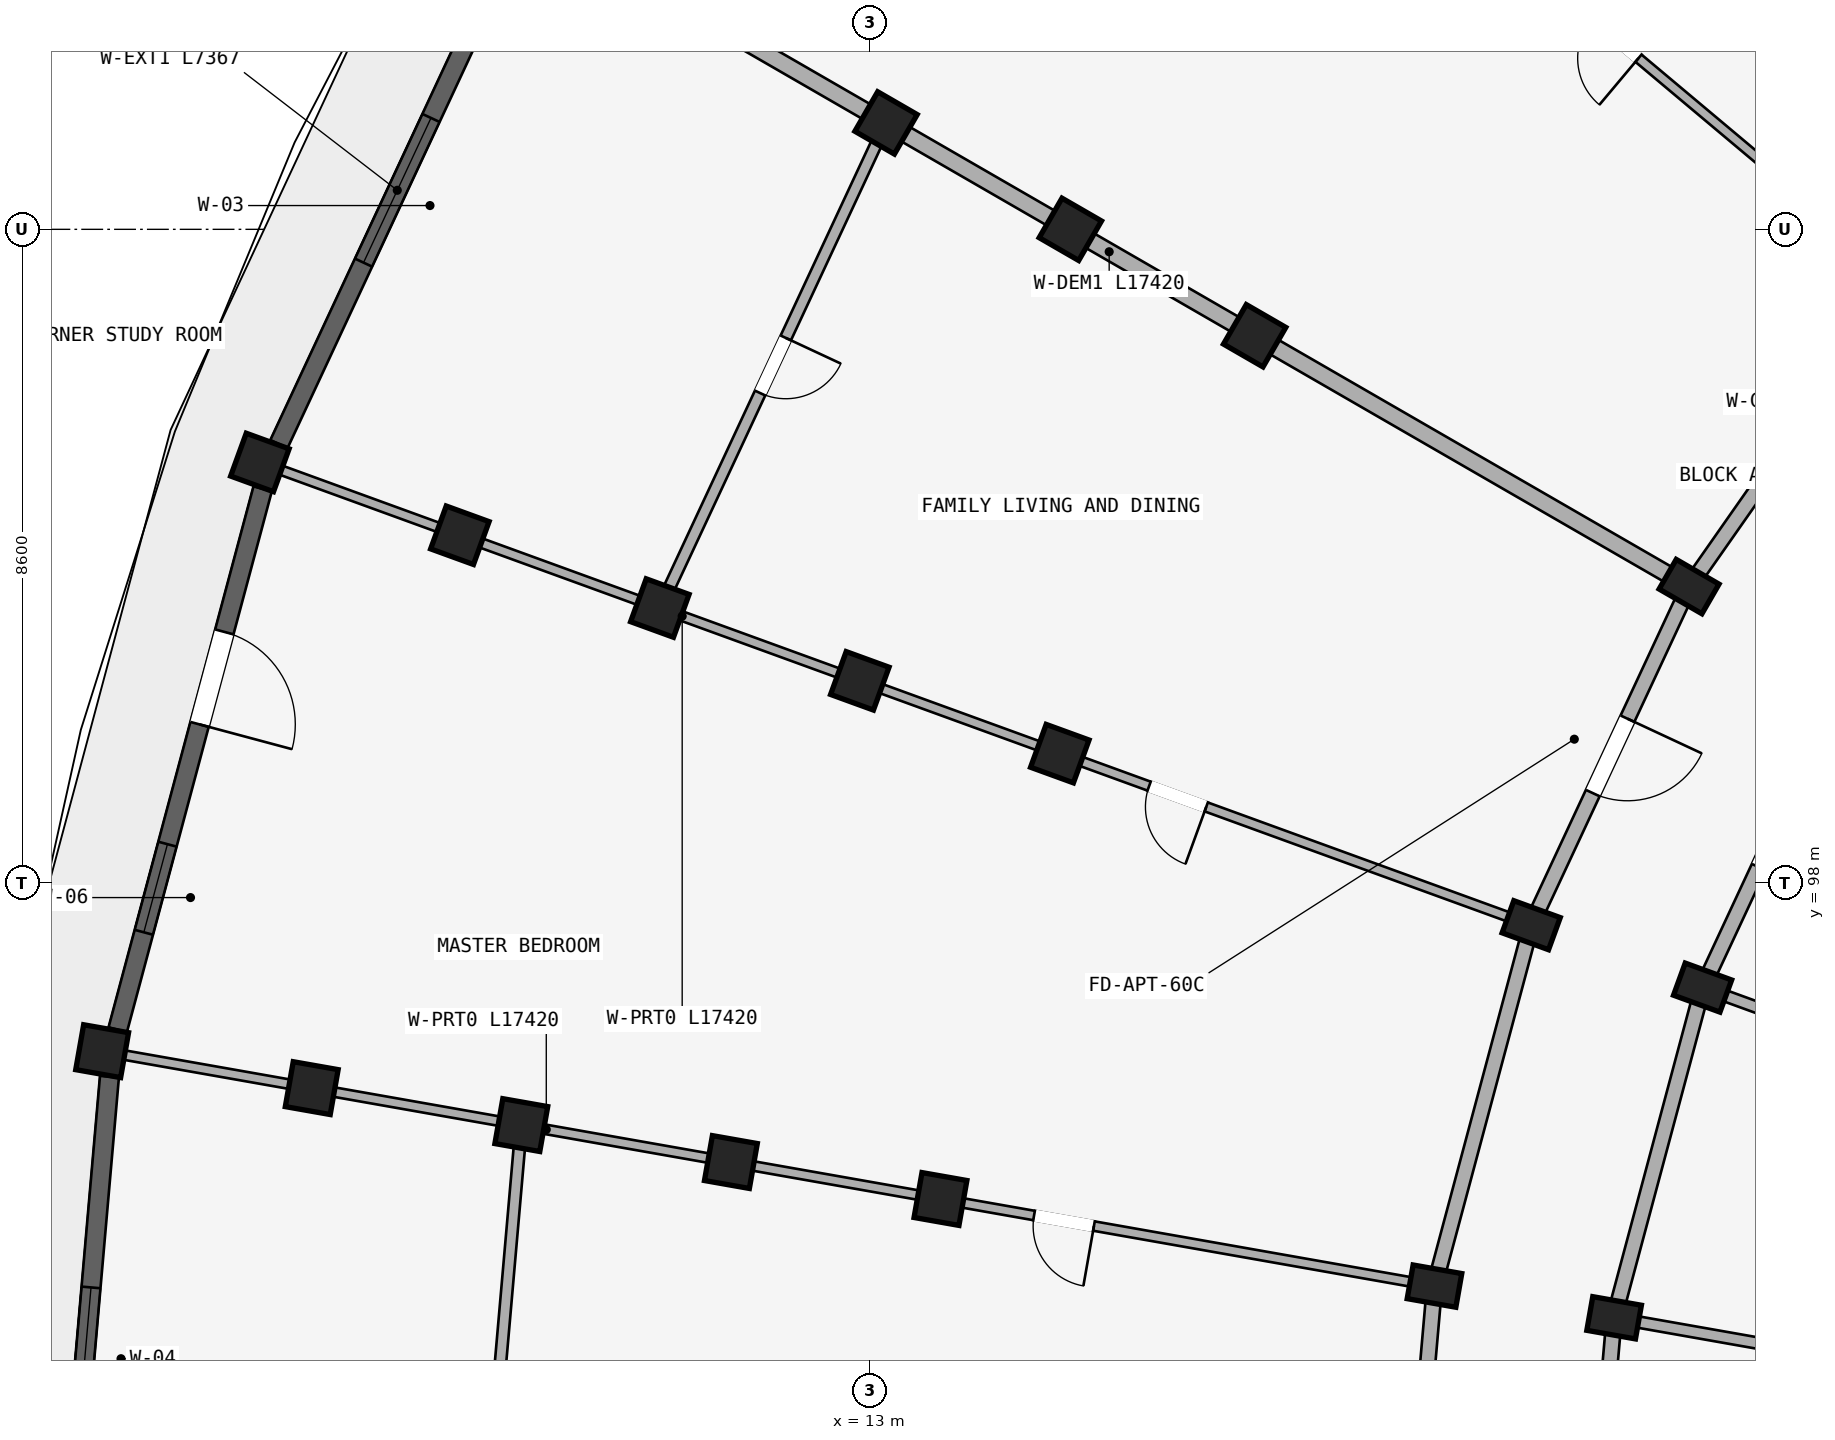
"""IFC4 building model, lengths in metres.
Left out: names, types, materials, properties, quantities, classifications, styles, units other than length and angle.
Written with IfcOpenShell. Run it as: python <this file> out.ifc"""

import sys

from ifc_helpers import new_model, si_unit, direction, frame, frame_2d, origin, origin_2d, place, context, subcontext, project, spatial, rectangle, extrude, element, fill, save


model = new_model("IFC4")
c1 = context("Model", 3, precision=1e-05, world=origin(), true_north=direction((0.0, 1.0)))
c2 = subcontext(c1, "Body", "Model", "MODEL_VIEW")
j1 = project(units=[si_unit("LENGTHUNIT", "METRE"), si_unit("PLANEANGLEUNIT", "RADIAN")], contexts=[c1])
p1 = place(None, origin())
s1 = spatial("IfcSite", under=j1, at=p1, CompositionType="ELEMENT")
p2 = place(p1, origin())
s2 = spatial("IfcBuilding", under=s1, at=p2, CompositionType="ELEMENT")
p3 = place(p2, frame((0.0, 0.0, 30.75)))
s3 = spatial("IfcBuildingStorey", under=s2, at=p3, CompositionType="ELEMENT", Elevation=30.75)
p4 = place(p3, frame((23.778, 101.9, 0.0), z_axis=(0.0, 0.0, 1.0), x_axis=(0.5, 0.866025403784, 0.0)))
e1 = element("IfcColumn", 1, at=p4, inside=s3, PredefinedType="COLUMN", context=c2, shape_type="SweptSolid", body=[
    extrude(rectangle(XDim=0.45, YDim=0.65, at=origin_2d()), origin(), (0.0, 0.0, 1.0), 2.93),
])
for number, where, z_axis, x_axis in (
    (2, (18.062, 105.2, 0.0), (0.0, 0.0, 1.0), (0.5, 0.866, 0.0)),
    (3, (15.637, 106.6, 0.0), (0.0, 0.0, 1.0), (0.5, 0.866, 0.0)),
    (4, (13.213, 108.0, 0.0), (0.0, 0.0, 1.0), (0.5, 0.866, 0.0)),
):
    element("IfcColumn", number, at=place(p3, frame(where, z_axis=z_axis, x_axis=x_axis)), inside=s3, PredefinedType="COLUMN", context=c2, shape_type="SweptSolid", body=[
        extrude(rectangle(XDim=0.6, YDim=0.6, at=origin_2d()), origin(), (0.0, 0.0, 1.0), 2.93),
    ])
for number, where, z_axis, x_axis in (
    (5, (23.956, 96.624, 0.0), (0.0, 0.0, 1.0), (0.342, 0.94, 0.0)),
    (6, (21.701, 97.445, 0.0), (0.0, 0.0, 1.0), (0.342, 0.94, 0.0)),
):
    element("IfcColumn", number, at=place(p3, frame(where, z_axis=z_axis, x_axis=x_axis)), inside=s3, PredefinedType="COLUMN", context=c2, shape_type="SweptSolid", body=[
        extrude(rectangle(XDim=0.45, YDim=0.65, at=origin_2d()), origin(), (0.0, 0.0, 1.0), 2.93),
    ])
for number, where, z_axis, x_axis in (
    (7, (15.499, 99.702, 0.0), (0.0, 0.0, 1.0), (0.342, 0.94, 0.0)),
    (8, (12.868, 100.66, 0.0), (0.0, 0.0, 1.0), (0.342, 0.94, 0.0)),
    (9, (10.236, 101.618, 0.0), (0.0, 0.0, 1.0), (0.342, 0.94, 0.0)),
    (10, (7.605, 102.575, 0.0), (0.0, 0.0, 1.0), (0.342, 0.94, 0.0)),
    (11, (4.974, 103.533, 0.0), (0.0, 0.0, 1.0), (0.342, 0.94, 0.0)),
):
    element("IfcColumn", number, at=place(p3, frame(where, z_axis=z_axis, x_axis=x_axis)), inside=s3, PredefinedType="COLUMN", context=c2, shape_type="SweptSolid", body=[
        extrude(rectangle(XDim=0.6, YDim=0.6, at=origin_2d()), origin(), (0.0, 0.0, 1.0), 2.93),
    ])
for number, where, z_axis, x_axis in (
    (12, (22.792, 92.28, 0.0), (0.0, 0.0, 1.0), (0.174, 0.985, 0.0)),
    (13, (20.428, 92.697, 0.0), (0.0, 0.0, 1.0), (0.174, 0.985, 0.0)),
):
    element("IfcColumn", number, at=place(p3, frame(where, z_axis=z_axis, x_axis=x_axis)), inside=s3, PredefinedType="COLUMN", context=c2, shape_type="SweptSolid", body=[
        extrude(rectangle(XDim=0.45, YDim=0.65, at=origin_2d()), origin(), (0.0, 0.0, 1.0), 2.93),
    ])
for number, where, z_axis, x_axis in (
    (14, (13.929, 93.843, 0.0), (0.0, 0.0, 1.0), (0.174, 0.985, 0.0)),
    (15, (11.171, 94.329, 0.0), (0.0, 0.0, 1.0), (0.174, 0.985, 0.0)),
    (16, (8.414, 94.815, 0.0), (0.0, 0.0, 1.0), (0.174, 0.985, 0.0)),
    (17, (5.656, 95.302, 0.0), (0.0, 0.0, 1.0), (0.174, 0.985, 0.0)),
    (18, (2.899, 95.788, 0.0), (0.0, 0.0, 1.0), (0.174, 0.985, 0.0)),
):
    element("IfcColumn", number, at=place(p3, frame(where, z_axis=z_axis, x_axis=x_axis)), inside=s3, PredefinedType="COLUMN", context=c2, shape_type="SweptSolid", body=[
        extrude(rectangle(XDim=0.6, YDim=0.6, at=origin_2d()), origin(), (0.0, 0.0, 1.0), 2.93),
    ])
p5 = place(p3, frame((26.598, 105.927, 0.0), z_axis=(0.0, 0.0, 1.0), x_axis=(-0.573592335331, -0.819140911474, 0.0)))
e19 = element("IfcWall", 19, at=p5, inside=s3, PredefinedType="STANDARD", context=c2, shape_type="SweptSolid", body=[
    extrude(rectangle(XDim=4.916, YDim=0.2, at=frame_2d((2.458, 0.0))), origin(), (0.0, 0.0, 1.0), 2.372),
])
p6 = place(p3, frame((25.856, 100.7, 0.0), z_axis=(0.0, 0.0, 1.0), x_axis=(-0.422617978463, -0.906307919131, 0.0)))
e20 = element("IfcWall", 20, at=p6, inside=s3, PredefinedType="STANDARD", context=c2, shape_type="SweptSolid", body=[
    extrude(rectangle(XDim=4.497, YDim=0.2, at=frame_2d((2.249, 0.0))), origin(), (0.0, 0.0, 1.0), 2.372),
])
p7 = place(p6, frame((1.749, 0.0, 0.0)))
e21 = element("IfcOpeningElement", 21, at=p7, cuts=e20, PredefinedType="OPENING", context=c2, shape_type="SweptSolid", body=[
    extrude(rectangle(XDim=1.0, YDim=2.15, at=frame_2d((0.5, 1.075))), frame((0.0, 0.11, 0.0), z_axis=(0.0, -1.0, 0.0), x_axis=(1.0, 0.0, 0.0)), (0.0, 0.0, 1.0), 0.22),
])
p8 = place(p3, frame((23.778, 101.9, 0.0), z_axis=(0.0, 0.0, 1.0), x_axis=(-0.422629854778, -0.906302381024, 0.0)))
e22 = element("IfcWall", 22, at=p8, inside=s3, PredefinedType="STANDARD", context=c2, shape_type="SweptSolid", body=[
    extrude(rectangle(XDim=4.915, YDim=0.2, at=frame_2d((2.458, 0.0))), origin(), (0.0, 0.0, 1.0), 2.372),
])
p9 = place(p8, frame((1.918, 0.0, 0.0)))
e23 = element("IfcOpeningElement", 23, at=p9, cuts=e22, PredefinedType="OPENING", context=c2, shape_type="SweptSolid", body=[
    extrude(rectangle(XDim=1.08, YDim=2.15, at=frame_2d((0.54, 1.075))), frame((0.0, 0.11, 0.0), z_axis=(0.0, -1.0, 0.0), x_axis=(1.0, 0.0, 0.0)), (0.0, 0.0, 1.0), 0.22),
])
p10 = place(p3, frame((23.956, 96.624, 0.0), z_axis=(0.0, 0.0, 1.0), x_axis=(-0.258787642463, -0.965934240054, 0.0)))
e24 = element("IfcWall", 24, at=p10, inside=s3, PredefinedType="STANDARD", context=c2, shape_type="SweptSolid", body=[
    extrude(rectangle(XDim=4.497, YDim=0.2, at=frame_2d((2.249, 0.0))), origin(), (0.0, 0.0, 1.0), 2.372),
])
p11 = place(p3, frame((21.701, 97.445, 0.0), z_axis=(0.0, 0.0, 1.0), x_axis=(-0.258803112091, -0.965930095386, 0.0)))
e25 = element("IfcWall", 25, at=p11, inside=s3, PredefinedType="STANDARD", context=c2, shape_type="SweptSolid", body=[
    extrude(rectangle(XDim=4.916, YDim=0.2, at=frame_2d((2.458, 0.0))), origin(), (0.0, 0.0, 1.0), 2.372),
])
p12 = place(p3, frame((22.792, 92.28, 0.0), z_axis=(0.0, 0.0, 1.0), x_axis=(-0.087187153726, -0.996191949488, 0.0)))
e26 = element("IfcWall", 26, at=p12, inside=s3, PredefinedType="STANDARD", context=c2, shape_type="SweptSolid", body=[
    extrude(rectangle(XDim=4.497, YDim=0.2, at=frame_2d((2.249, 0.0))), origin(), (0.0, 0.0, 1.0), 2.372),
])
p13 = place(p3, frame((20.428, 92.697, 0.0), z_axis=(0.0, 0.0, 1.0), x_axis=(-0.087167566415, -0.996193663584, 0.0)))
e27 = element("IfcWall", 27, at=p13, inside=s3, PredefinedType="STANDARD", context=c2, shape_type="SweptSolid", body=[
    extrude(rectangle(XDim=4.916, YDim=0.2, at=frame_2d((2.458, 0.0))), origin(), (0.0, 0.0, 1.0), 2.372),
])
p14 = place(p3, frame((26.521, 105.991, 0.0), z_axis=(0.0, 0.0, 1.0), x_axis=(-0.766046835987, 0.642784757967, 0.0)))
e28 = element("IfcWall", 28, at=p14, inside=s3, PredefinedType="PARTITIONING", context=c2, shape_type="SweptSolid", body=[
    extrude(rectangle(XDim=17.42, YDim=0.125, at=frame_2d((8.71, 0.0))), origin(), (0.0, 0.0, 1.0), 2.372),
])
p15 = place(p14, frame((4.45, 0.0, 0.0)))
e29 = element("IfcOpeningElement", 29, at=p15, cuts=e28, PredefinedType="OPENING", context=c2, shape_type="SweptSolid", body=[
    extrude(rectangle(XDim=0.8, YDim=2.1, at=frame_2d((0.4, 1.05))), frame((0.0, 0.073, 0.0), z_axis=(0.0, -1.0, 0.0), x_axis=(1.0, 0.0, 0.0)), (0.0, 0.0, 1.0), 0.145),
])
p16 = place(p3, frame((23.691, 101.95, 0.0), z_axis=(0.0, 0.0, 1.0), x_axis=(-0.866026648973, 0.499997843263, 0.0)))
e30 = element("IfcWall", 30, at=p16, inside=s3, PredefinedType="STANDARD", context=c2, shape_type="SweptSolid", body=[
    extrude(rectangle(XDim=17.42, YDim=0.22, at=frame_2d((8.71, 0.0))), origin(), (0.0, 0.0, 1.0), 2.372),
])
p17 = place(p3, frame((30.346, 94.298, 0.0), z_axis=(0.0, 0.0, 1.0), x_axis=(-0.939696231917, 0.342010221662, 0.0)))
e31 = element("IfcWall", 31, at=p17, inside=s3, PredefinedType="PARTITIONING", context=c2, shape_type="SweptSolid", body=[
    extrude(rectangle(XDim=6.75, YDim=0.15, at=frame_2d((3.375, 0.0))), origin(), (0.0, 0.0, 1.0), 2.372),
])
p18 = place(p17, frame((3.222, 0.0, 0.0)))
e32 = element("IfcOpeningElement", 32, at=p18, cuts=e31, PredefinedType="OPENING", context=c2, shape_type="SweptSolid", body=[
    extrude(rectangle(XDim=0.98, YDim=2.12, at=frame_2d((0.49, 1.06))), frame((0.0, 0.085, 0.0), z_axis=(0.0, -1.0, 0.0), x_axis=(1.0, 0.0, 0.0)), (0.0, 0.0, 1.0), 0.17),
])
p19 = place(p3, frame((21.607, 97.479, 0.0), z_axis=(0.0, 0.0, 1.0), x_axis=(-0.939691901159, 0.342022120477, 0.0)))
e33 = element("IfcWall", 33, at=p19, inside=s3, PredefinedType="PARTITIONING", context=c2, shape_type="SweptSolid", body=[
    extrude(rectangle(XDim=17.42, YDim=0.125, at=frame_2d((8.71, 0.0))), origin(), (0.0, 0.0, 1.0), 2.372),
])
p20 = place(p19, frame((4.45, 0.0, 0.0)))
e34 = element("IfcOpeningElement", 34, at=p20, cuts=e33, PredefinedType="OPENING", context=c2, shape_type="SweptSolid", body=[
    extrude(rectangle(XDim=0.8, YDim=2.1, at=frame_2d((0.4, 1.05))), frame((0.0, 0.073, 0.0), z_axis=(0.0, -1.0, 0.0), x_axis=(1.0, 0.0, 0.0)), (0.0, 0.0, 1.0), 0.145),
])
p21 = place(p3, frame((29.489, 91.099, 0.0), z_axis=(0.0, 0.0, 1.0), x_axis=(-0.984807944945, 0.173647089161, 0.0)))
e35 = element("IfcWall", 35, at=p21, inside=s3, PredefinedType="PARTITIONING", context=c2, shape_type="SweptSolid", body=[
    extrude(rectangle(XDim=6.75, YDim=0.15, at=frame_2d((3.375, 0.0))), origin(), (0.0, 0.0, 1.0), 2.372),
])
p22 = place(p21, frame((3.262, 0.0, 0.0)))
e36 = element("IfcOpeningElement", 36, at=p22, cuts=e35, PredefinedType="OPENING", context=c2, shape_type="SweptSolid", body=[
    extrude(rectangle(XDim=0.9, YDim=2.1, at=frame_2d((0.45, 1.05))), frame((0.0, 0.085, 0.0), z_axis=(0.0, -1.0, 0.0), x_axis=(1.0, 0.0, 0.0)), (0.0, 0.0, 1.0), 0.17),
])
p23 = place(p3, frame((20.33, 92.714, 0.0), z_axis=(0.0, 0.0, 1.0), x_axis=(-0.984808098809, 0.173646216546, 0.0)))
e37 = element("IfcWall", 37, at=p23, inside=s3, PredefinedType="PARTITIONING", context=c2, shape_type="SweptSolid", body=[
    extrude(rectangle(XDim=17.42, YDim=0.125, at=frame_2d((8.71, 0.0))), origin(), (0.0, 0.0, 1.0), 2.372),
])
p24 = place(p23, frame((4.45, 0.0, 0.0)))
e38 = element("IfcOpeningElement", 38, at=p24, cuts=e37, PredefinedType="OPENING", context=c2, shape_type="SweptSolid", body=[
    extrude(rectangle(XDim=0.8, YDim=2.1, at=frame_2d((0.4, 1.05))), frame((0.0, 0.073, 0.0), z_axis=(0.0, -1.0, 0.0), x_axis=(1.0, 0.0, 0.0)), (0.0, 0.0, 1.0), 0.145),
])
p25 = place(p3, frame((13.213, 108.0, 0.0), z_axis=(0.0, 0.0, 1.0), x_axis=(-0.422640621205, -0.906297360311, 0.0)))
e39 = element("IfcWall", 39, at=p25, inside=s3, PredefinedType="PLUMBINGWALL", context=c2, shape_type="SweptSolid", body=[
    extrude(rectangle(XDim=7.042, YDim=0.15, at=frame_2d((3.521, 0.0))), origin(), (0.0, 0.0, 1.0), 2.372),
])
p26 = place(p25, frame((3.121, 0.0, 0.0)))
e40 = element("IfcOpeningElement", 40, at=p26, cuts=e39, PredefinedType="OPENING", context=c2, shape_type="SweptSolid", body=[
    extrude(rectangle(XDim=0.8, YDim=2.1, at=frame_2d((0.4, 1.05))), frame((0.0, 0.085, 0.0), z_axis=(0.0, -1.0, 0.0), x_axis=(1.0, 0.0, 0.0)), (0.0, 0.0, 1.0), 0.17),
])
p27 = place(p3, frame((8.414, 94.815, 0.0), z_axis=(0.0, 0.0, 1.0), x_axis=(-0.087156198737, -0.996194658198, 0.0)))
e41 = element("IfcWall", 41, at=p27, inside=s3, PredefinedType="PLUMBINGWALL", context=c2, shape_type="SweptSolid", body=[
    extrude(rectangle(XDim=7.042, YDim=0.15, at=frame_2d((3.521, 0.0))), origin(), (0.0, 0.0, 1.0), 2.372),
])
p28 = place(p27, frame((3.141, 0.0, 0.0)))
e42 = element("IfcOpeningElement", 42, at=p28, cuts=e41, PredefinedType="OPENING", context=c2, shape_type="SweptSolid", body=[
    extrude(rectangle(XDim=0.76, YDim=2.05, at=frame_2d((0.38, 1.025))), frame((0.0, 0.085, 0.0), z_axis=(0.0, -1.0, 0.0), x_axis=(1.0, 0.0, 0.0)), (0.0, 0.0, 1.0), 0.17),
])
p29 = place(p3, frame((8.338, 110.452, 0.0), z_axis=(0.0, 0.0, 1.0), x_axis=(-0.422589730823, -0.906321090675, 0.0)))
e43 = element("IfcWall", 43, at=p29, inside=s3, PredefinedType="STANDARD", context=c2, shape_type="SweptSolid", body=[
    extrude(rectangle(XDim=7.367, YDim=0.25, at=frame_2d((3.684, 0.0))), origin(), (0.0, 0.0, 1.0), 2.372),
])
p30 = place(p29, frame((2.634, 0.0, 0.372)))
e44 = element("IfcOpeningElement", 44, at=p30, cuts=e43, PredefinedType="OPENING", context=c2, shape_type="SweptSolid", body=[
    extrude(rectangle(XDim=2.1, YDim=1.8, at=frame_2d((1.05, 0.9))), frame((0.0, 0.135, 0.0), z_axis=(0.0, -1.0, 0.0), x_axis=(1.0, 0.0, 0.0)), (0.0, 0.0, 1.0), 0.27),
])
p31 = place(p3, frame((5.01, 103.186, 0.0), z_axis=(0.0, 0.0, 1.0), x_axis=(-0.258821669831, -0.965925122991, 0.0)))
e45 = element("IfcWall", 45, at=p31, inside=s3, PredefinedType="STANDARD", context=c2, shape_type="SweptSolid", body=[
    extrude(rectangle(XDim=7.367, YDim=0.25, at=frame_2d((3.684, 0.0))), origin(), (0.0, 0.0, 1.0), 2.372),
])
p32 = place(p31, frame((4.84, 0.0, 0.322)))
e46 = element("IfcOpeningElement", 46, at=p32, cuts=e45, PredefinedType="OPENING", context=c2, shape_type="SweptSolid", body=[
    extrude(rectangle(XDim=1.2, YDim=1.5, at=frame_2d((0.6, 0.75))), frame((0.0, 0.135, 0.0), z_axis=(0.0, -1.0, 0.0), x_axis=(1.0, 0.0, 0.0)), (0.0, 0.0, 1.0), 0.27),
])
p33 = place(p31, frame((1.948, 0.0, 0.0)))
e47 = element("IfcOpeningElement", 47, at=p33, cuts=e45, PredefinedType="OPENING", context=c2, shape_type="SweptSolid", body=[
    extrude(rectangle(XDim=1.26, YDim=2.15, at=frame_2d((0.63, 1.075))), frame((0.0, 0.135, 0.0), z_axis=(0.0, -1.0, 0.0), x_axis=(1.0, 0.0, 0.0)), (0.0, 0.0, 1.0), 0.27),
])
p34 = place(p3, frame((2.995, 95.453, 0.0), z_axis=(0.0, 0.0, 1.0), x_axis=(-0.087122963287, -0.996197565379, 0.0)))
e48 = element("IfcWall", 48, at=p34, inside=s3, PredefinedType="STANDARD", context=c2, shape_type="SweptSolid", body=[
    extrude(rectangle(XDim=7.367, YDim=0.25, at=frame_2d((3.684, 0.0))), origin(), (0.0, 0.0, 1.0), 2.372),
])
p35 = place(p34, frame((2.783, 0.0, 0.522)))
e49 = element("IfcOpeningElement", 49, at=p35, cuts=e48, PredefinedType="OPENING", context=c2, shape_type="SweptSolid", body=[
    extrude(rectangle(XDim=1.8, YDim=1.65, at=frame_2d((0.9, 0.825))), frame((0.0, 0.135, 0.0), z_axis=(0.0, -1.0, 0.0), x_axis=(1.0, 0.0, 0.0)), (0.0, 0.0, 1.0), 0.27),
])
p36 = place(p30, origin())
e50 = element("IfcWindow", 50, at=p36, inside=s3, PartitioningType="TRIPLE_PANEL_VERTICAL", PredefinedType="WINDOW", context=c2, shape_type="SweptSolid", body=[
    extrude(rectangle(XDim=2.1, YDim=1.8, at=frame_2d((1.05, 0.9))), frame((0.0, 0.03, 0.0), z_axis=(0.0, -1.0, 0.0), x_axis=(1.0, 0.0, 0.0)), (0.0, 0.0, 1.0), 0.06),
])
fill(e44, e50)
p37 = place(p32, origin())
e51 = element("IfcWindow", 51, at=p37, inside=s3, PartitioningType="SINGLE_PANEL", PredefinedType="WINDOW", context=c2, shape_type="SweptSolid", body=[
    extrude(rectangle(XDim=1.2, YDim=1.5, at=frame_2d((0.6, 0.75))), frame((0.0, 0.03, 0.0), z_axis=(0.0, -1.0, 0.0), x_axis=(1.0, 0.0, 0.0)), (0.0, 0.0, 1.0), 0.06),
])
fill(e46, e51)
p38 = place(p35, origin())
e52 = element("IfcWindow", 52, at=p38, inside=s3, PartitioningType="DOUBLE_PANEL_VERTICAL", PredefinedType="WINDOW", context=c2, shape_type="SweptSolid", body=[
    extrude(rectangle(XDim=1.8, YDim=1.65, at=frame_2d((0.9, 0.825))), frame((0.0, 0.03, 0.0), z_axis=(0.0, -1.0, 0.0), x_axis=(1.0, 0.0, 0.0)), (0.0, 0.0, 1.0), 0.06),
])
fill(e49, e52)
p39 = place(p15, frame((0.8, 0.0, 0.0), z_axis=(0.0, 0.0, 1.0), x_axis=(-1.0, 0.0, 0.0)))
e53 = element("IfcDoor", 53, at=p39, inside=s3, OperationType="SINGLE_SWING_RIGHT", PredefinedType="DOOR", context=c2, shape_type="SweptSolid", body=[
    extrude(rectangle(XDim=0.8, YDim=2.1, at=frame_2d((0.4, 1.05))), frame((0.0, 0.025, 0.0), z_axis=(0.0, -1.0, 0.0), x_axis=(1.0, 0.0, 0.0)), (0.0, 0.0, 1.0), 0.05),
])
fill(e29, e53)
p40 = place(p20, frame((0.8, 0.0, 0.0), z_axis=(0.0, 0.0, 1.0), x_axis=(-1.0, 0.0, 0.0)))
e54 = element("IfcDoor", 54, at=p40, inside=s3, OperationType="SINGLE_SWING_RIGHT", PredefinedType="DOOR", context=c2, shape_type="SweptSolid", body=[
    extrude(rectangle(XDim=0.8, YDim=2.1, at=frame_2d((0.4, 1.05))), frame((0.0, 0.025, 0.0), z_axis=(0.0, -1.0, 0.0), x_axis=(1.0, 0.0, 0.0)), (0.0, 0.0, 1.0), 0.05),
])
fill(e34, e54)
p41 = place(p24, frame((0.8, 0.0, 0.0), z_axis=(0.0, 0.0, 1.0), x_axis=(-1.0, 0.0, 0.0)))
e55 = element("IfcDoor", 55, at=p41, inside=s3, OperationType="SINGLE_SWING_RIGHT", PredefinedType="DOOR", context=c2, shape_type="SweptSolid", body=[
    extrude(rectangle(XDim=0.8, YDim=2.1, at=frame_2d((0.4, 1.05))), frame((0.0, 0.025, 0.0), z_axis=(0.0, -1.0, 0.0), x_axis=(1.0, 0.0, 0.0)), (0.0, 0.0, 1.0), 0.05),
])
fill(e38, e55)
p42 = place(p9, origin())
e56 = element("IfcDoor", 56, at=p42, inside=s3, OperationType="SINGLE_SWING_LEFT", PredefinedType="DOOR", context=c2, shape_type="SweptSolid", body=[
    extrude(rectangle(XDim=1.08, YDim=2.15, at=frame_2d((0.54, 1.075))), frame((0.0, 0.025, 0.0), z_axis=(0.0, -1.0, 0.0), x_axis=(1.0, 0.0, 0.0)), (0.0, 0.0, 1.0), 0.05),
])
fill(e23, e56)
p43 = place(p26, frame((0.8, 0.0, 0.0), z_axis=(0.0, 0.0, 1.0), x_axis=(-1.0, 0.0, 0.0)))
e57 = element("IfcDoor", 57, at=p43, inside=s3, OperationType="SINGLE_SWING_RIGHT", PredefinedType="DOOR", context=c2, shape_type="SweptSolid", body=[
    extrude(rectangle(XDim=0.8, YDim=2.1, at=frame_2d((0.4, 1.05))), frame((0.0, 0.025, 0.0), z_axis=(0.0, -1.0, 0.0), x_axis=(1.0, 0.0, 0.0)), (0.0, 0.0, 1.0), 0.05),
])
fill(e40, e57)
p44 = place(p33, frame((1.26, 0.0, 0.0), z_axis=(0.0, 0.0, 1.0), x_axis=(-1.0, 0.0, 0.0)))
e58 = element("IfcDoor", 58, at=p44, inside=s3, OperationType="SINGLE_SWING_LEFT", PredefinedType="DOOR", context=c2, shape_type="SweptSolid", body=[
    extrude(rectangle(XDim=1.26, YDim=2.15, at=frame_2d((0.63, 1.075))), frame((0.0, 0.025, 0.0), z_axis=(0.0, -1.0, 0.0), x_axis=(1.0, 0.0, 0.0)), (0.0, 0.0, 1.0), 0.05),
])
fill(e47, e58)
save(model, sys.argv[1])
